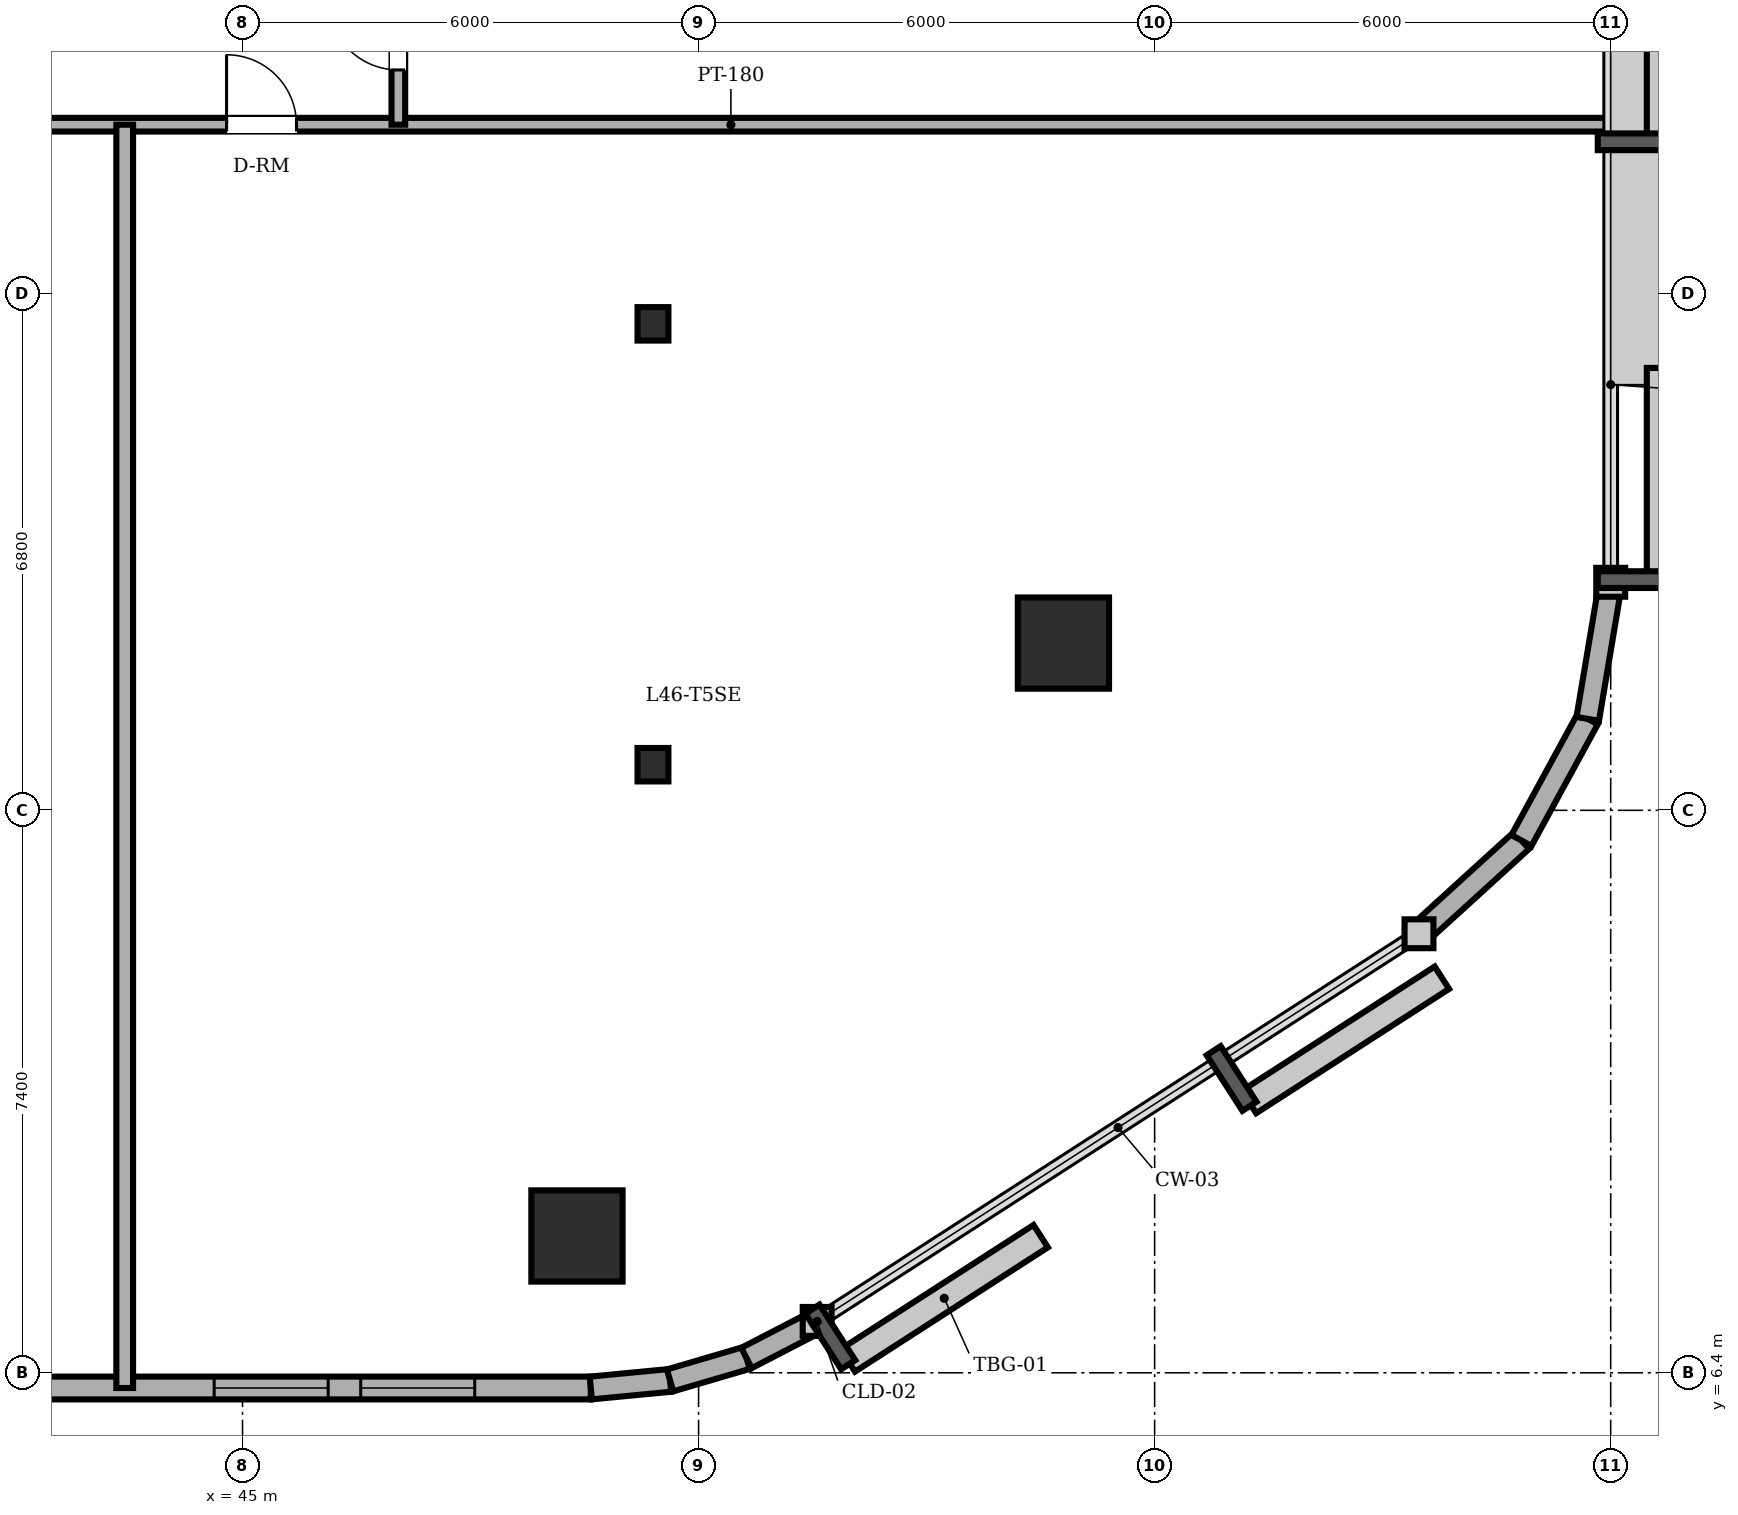
"""IFC4 building model, lengths in metres.
Left out: names, types, materials, properties, quantities, classifications, styles, units other than length and angle.
Written with IfcOpenShell. Run it as: python <this file> out.ifc"""

import sys

from ifc_helpers import new_model, si_unit, direction, frame, frame_2d, origin, origin_2d, place, context, subcontext, project, spatial, rectangle, circle, i_section, extrude, element, fill, save


model = new_model("IFC4")
c1 = context("Model", 3, precision=1e-05, world=origin(), true_north=direction((0.0, 1.0)))
c2 = subcontext(c1, "Body", "Model", "MODEL_VIEW")
j1 = project(units=[si_unit("LENGTHUNIT", "METRE"), si_unit("PLANEANGLEUNIT", "RADIAN")], contexts=[c1])
p1 = place(None, origin())
s1 = spatial("IfcSite", under=j1, at=p1, CompositionType="ELEMENT")
p2 = place(p1, origin())
s2 = spatial("IfcBuilding", under=s1, at=p2, CompositionType="ELEMENT")
p3 = place(p2, frame((0.0, 0.0, 176.2)))
s3 = spatial("IfcBuildingStorey", under=s2, at=p3, CompositionType="ELEMENT", Elevation=176.2)
for number, where, z_axis, x_axis in (
    (1, (49.4, 8.2, 0.0), (0.0, 0.0, 1.0), (1.0, 0.0, 0.0)),
    (2, (55.8, 16.0, 0.0), (0.0, 0.0, 1.0), (1.0, 0.0, 0.0)),
):
    element("IfcColumn", number, at=place(p3, frame(where, z_axis=z_axis, x_axis=x_axis)), inside=s3, PredefinedType="COLUMN", context=c2, shape_type="SweptSolid", body=[
        extrude(circle(Radius=0.6, at=origin_2d()), origin(), (0.0, 0.0, 1.0), 3.6),
    ])
for number, where, z_axis, x_axis in (
    (3, (50.4, 14.4, 0.0), (0.0, 0.0, 1.0), (1.0, 0.0, 0.0)),
    (4, (50.4, 20.2, 0.0), (0.0, 0.0, 1.0), (1.0, 0.0, 0.0)),
):
    element("IfcColumn", number, at=place(p3, frame(where, z_axis=z_axis, x_axis=x_axis)), inside=s3, PredefinedType="COLUMN", context=c2, shape_type="SweptSolid", body=[
        extrude(i_section(OverallWidth=0.406, OverallDepth=0.44, WebThickness=0.024, FlangeThickness=0.039, FilletRadius=0.015, at=origin_2d()), origin(), (0.0, 0.0, 1.0), 3.6),
    ])
p4 = place(p3, frame((19.3, 6.2, 0.0), z_axis=(0.0, 0.0, 1.0), x_axis=(1.0, 0.0, 0.0)))
e5 = element("IfcWall", 5, at=p4, inside=s3, PredefinedType="SOLIDWALL", context=c2, shape_type="SweptSolid", body=[
    extrude(rectangle(XDim=30.282, YDim=0.3, at=frame_2d((15.141, 0.0))), origin(), (0.0, 0.0, 1.0), 3.4),
])
p5 = place(p4, frame((7.725, 0.0, 0.0)))
e6 = element("IfcOpeningElement", 6, at=p5, cuts=e5, PredefinedType="OPENING", context=c2, shape_type="SweptSolid", body=[
    extrude(rectangle(XDim=0.95, YDim=2.2, at=frame_2d((0.475, 1.1))), frame((0.0, 0.16, 0.0), z_axis=(0.0, -1.0, 0.0), x_axis=(1.0, 0.0, 0.0)), (0.0, 0.0, 1.0), 0.32),
])
p6 = place(p4, frame((1.25, 0.0, 0.85)))
e7 = element("IfcOpeningElement", 7, at=p6, cuts=e5, PredefinedType="OPENING", context=c2, shape_type="SweptSolid", body=[
    extrude(rectangle(XDim=1.5, YDim=1.55, at=frame_2d((0.75, 0.775))), frame((0.0, 0.16, 0.0), z_axis=(0.0, -1.0, 0.0), x_axis=(1.0, 0.0, 0.0)), (0.0, 0.0, 1.0), 0.32),
])
p7 = place(p4, frame((2.9, 0.0, 0.85)))
e8 = element("IfcOpeningElement", 8, at=p7, cuts=e5, PredefinedType="OPENING", context=c2, shape_type="SweptSolid", body=[
    extrude(rectangle(XDim=1.5, YDim=1.55, at=frame_2d((0.75, 0.775))), frame((0.0, 0.16, 0.0), z_axis=(0.0, -1.0, 0.0), x_axis=(1.0, 0.0, 0.0)), (0.0, 0.0, 1.0), 0.32),
])
p8 = place(p4, frame((12.167, 0.0, 0.85)))
e9 = element("IfcOpeningElement", 9, at=p8, cuts=e5, PredefinedType="OPENING", context=c2, shape_type="SweptSolid", body=[
    extrude(rectangle(XDim=1.5, YDim=1.55, at=frame_2d((0.75, 0.775))), frame((0.0, 0.16, 0.0), z_axis=(0.0, -1.0, 0.0), x_axis=(1.0, 0.0, 0.0)), (0.0, 0.0, 1.0), 0.32),
])
p9 = place(p4, frame((15.983, 0.0, 0.85)))
e10 = element("IfcOpeningElement", 10, at=p9, cuts=e5, PredefinedType="OPENING", context=c2, shape_type="SweptSolid", body=[
    extrude(rectangle(XDim=1.5, YDim=1.55, at=frame_2d((0.75, 0.775))), frame((0.0, 0.16, 0.0), z_axis=(0.0, -1.0, 0.0), x_axis=(1.0, 0.0, 0.0)), (0.0, 0.0, 1.0), 0.32),
])
p10 = place(p4, frame((21.6, 0.0, 0.85)))
e11 = element("IfcOpeningElement", 11, at=p10, cuts=e5, PredefinedType="OPENING", context=c2, shape_type="SweptSolid", body=[
    extrude(rectangle(XDim=1.5, YDim=1.55, at=frame_2d((0.75, 0.775))), frame((0.0, 0.16, 0.0), z_axis=(0.0, -1.0, 0.0), x_axis=(1.0, 0.0, 0.0)), (0.0, 0.0, 1.0), 0.32),
])
p11 = place(p4, frame((25.327, 0.0, 0.85)))
e12 = element("IfcOpeningElement", 12, at=p11, cuts=e5, PredefinedType="OPENING", context=c2, shape_type="SweptSolid", body=[
    extrude(rectangle(XDim=1.5, YDim=1.55, at=frame_2d((0.75, 0.775))), frame((0.0, 0.16, 0.0), z_axis=(0.0, -1.0, 0.0), x_axis=(1.0, 0.0, 0.0)), (0.0, 0.0, 1.0), 0.32),
])
p12 = place(p4, frame((27.255, 0.0, 0.85)))
e13 = element("IfcOpeningElement", 13, at=p12, cuts=e5, PredefinedType="OPENING", context=c2, shape_type="SweptSolid", body=[
    extrude(rectangle(XDim=1.5, YDim=1.55, at=frame_2d((0.75, 0.775))), frame((0.0, 0.16, 0.0), z_axis=(0.0, -1.0, 0.0), x_axis=(1.0, 0.0, 0.0)), (0.0, 0.0, 1.0), 0.32),
])
p13 = place(p3, frame((49.582, 6.2, 0.0), z_axis=(0.0, 0.0, 1.0), x_axis=(0.995426089968, 0.095534807324, 0.0)))
e14 = element("IfcWall", 14, at=p13, inside=s3, PredefinedType="SOLIDWALL", context=c2, shape_type="SweptSolid", body=[
    extrude(rectangle(XDim=1.048, YDim=0.3, at=frame_2d((0.524, 0.0))), origin(), (0.0, 0.0, 1.0), 3.4),
])
p14 = place(p3, frame((50.625, 6.3, 0.0), z_axis=(0.0, 0.0, 1.0), x_axis=(0.959528674476, 0.281610942363, 0.0)))
e15 = element("IfcWall", 15, at=p14, inside=s3, PredefinedType="SOLIDWALL", context=c2, shape_type="SweptSolid", body=[
    extrude(rectangle(XDim=1.047, YDim=0.3, at=frame_2d((0.524, 0.0))), origin(), (0.0, 0.0, 1.0), 3.4),
])
p15 = place(p3, frame((51.63, 6.595, 0.0), z_axis=(0.0, 0.0, 1.0), x_axis=(0.888283247196, 0.459296062198, 0.0)))
e16 = element("IfcWall", 16, at=p15, inside=s3, PredefinedType="SOLIDWALL", context=c2, shape_type="SweptSolid", body=[
    extrude(rectangle(XDim=1.047, YDim=0.3, at=frame_2d((0.523, 0.0))), origin(), (0.0, 0.0, 1.0), 3.4),
])
p16 = place(p3, frame((60.478, 12.176, 0.0), z_axis=(0.0, 0.0, 1.0), x_axis=(0.73947929393, 0.673179302897, 0.0)))
e17 = element("IfcWall", 17, at=p16, inside=s3, PredefinedType="SOLIDWALL", context=c2, shape_type="SweptSolid", body=[
    extrude(rectangle(XDim=1.823, YDim=0.3, at=frame_2d((0.911, 0.0))), origin(), (0.0, 0.0, 1.0), 3.4),
])
p17 = place(p3, frame((61.826, 13.403, 0.0), z_axis=(0.0, 0.0, 1.0), x_axis=(0.478608030646, 0.878028674362, 0.0)))
e18 = element("IfcWall", 18, at=p17, inside=s3, PredefinedType="SOLIDWALL", context=c2, shape_type="SweptSolid", body=[
    extrude(rectangle(XDim=1.822, YDim=0.3, at=frame_2d((0.911, 0.0))), origin(), (0.0, 0.0, 1.0), 3.4),
])
p18 = place(p3, frame((62.698, 15.003, 0.0), z_axis=(0.0, 0.0, 1.0), x_axis=(0.165724081207, 0.986172159873, 0.0)))
e19 = element("IfcWall", 19, at=p18, inside=s3, PredefinedType="SOLIDWALL", context=c2, shape_type="SweptSolid", body=[
    extrude(rectangle(XDim=1.822, YDim=0.3, at=frame_2d((0.911, 0.0))), origin(), (0.0, 0.0, 1.0), 3.4),
])
p19 = place(p3, frame((39.85, 22.82, 0.0), z_axis=(0.0, 0.0, 1.0), x_axis=(1.0, 0.0, 0.0)))
e20 = element("IfcWall", 20, at=p19, inside=s3, PredefinedType="PARTITIONING", context=c2, shape_type="SweptSolid", body=[
    extrude(rectangle(XDim=23.15, YDim=0.18, at=frame_2d((11.575, 0.0))), origin(), (0.0, 0.0, 1.0), 3.4),
])
p20 = place(p19, frame((4.94, 0.0, 0.0)))
e21 = element("IfcOpeningElement", 21, at=p20, cuts=e20, PredefinedType="OPENING", context=c2, shape_type="SweptSolid", body=[
    extrude(rectangle(XDim=0.92, YDim=2.1, at=frame_2d((0.46, 1.05))), frame((0.0, 0.1, 0.0), z_axis=(0.0, -1.0, 0.0), x_axis=(1.0, 0.0, 0.0)), (0.0, 0.0, 1.0), 0.2),
])
p21 = place(p3, frame((43.45, 6.2, 0.0), z_axis=(0.0, 0.0, 1.0), x_axis=(0.0, 1.0, 0.0)))
e22 = element("IfcWall", 22, at=p21, inside=s3, PredefinedType="PARTITIONING", context=c2, shape_type="SweptSolid", body=[
    extrude(rectangle(XDim=16.62, YDim=0.22, at=frame_2d((8.31, 0.0))), origin(), (0.0, 0.0, 1.0), 3.4),
])
p22 = place(p3, frame((47.05, 22.82, 0.0), z_axis=(0.0, 0.0, 1.0), x_axis=(0.0, 1.0, 0.0)))
e23 = element("IfcWall", 23, at=p22, inside=s3, PredefinedType="PARTITIONING", context=c2, shape_type="SweptSolid", body=[
    extrude(rectangle(XDim=2.36, YDim=0.18, at=frame_2d((1.18, 0.0))), origin(), (0.0, 0.0, 1.0), 3.4),
])
p23 = place(p22, frame((0.72, 0.0, 0.0)))
e24 = element("IfcOpeningElement", 24, at=p23, cuts=e23, PredefinedType="OPENING", context=c2, shape_type="SweptSolid", body=[
    extrude(rectangle(XDim=0.92, YDim=2.1, at=frame_2d((0.46, 1.05))), frame((0.0, 0.1, 0.0), z_axis=(0.0, -1.0, 0.0), x_axis=(1.0, 0.0, 0.0)), (0.0, 0.0, 1.0), 0.2),
])
p24 = place(p11, origin())
e25 = element("IfcWindow", 25, at=p24, inside=s3, PartitioningType="DOUBLE_PANEL_VERTICAL", PredefinedType="WINDOW", context=c2, shape_type="SweptSolid", body=[
    extrude(rectangle(XDim=1.5, YDim=1.55, at=frame_2d((0.75, 0.775))), frame((0.0, 0.03, 0.0), z_axis=(0.0, -1.0, 0.0), x_axis=(1.0, 0.0, 0.0)), (0.0, 0.0, 1.0), 0.06),
])
fill(e12, e25)
p25 = place(p12, origin())
e26 = element("IfcWindow", 26, at=p25, inside=s3, PartitioningType="DOUBLE_PANEL_VERTICAL", PredefinedType="WINDOW", context=c2, shape_type="SweptSolid", body=[
    extrude(rectangle(XDim=1.5, YDim=1.55, at=frame_2d((0.75, 0.775))), frame((0.0, 0.03, 0.0), z_axis=(0.0, -1.0, 0.0), x_axis=(1.0, 0.0, 0.0)), (0.0, 0.0, 1.0), 0.06),
])
fill(e13, e26)
p26 = place(p23, origin())
e27 = element("IfcDoor", 27, at=p26, inside=s3, OperationType="SINGLE_SWING_RIGHT", PredefinedType="DOOR", context=c2, shape_type="SweptSolid", body=[
    extrude(rectangle(XDim=0.92, YDim=2.1, at=frame_2d((0.46, 1.05))), frame((0.0, 0.025, 0.0), z_axis=(0.0, -1.0, 0.0), x_axis=(1.0, 0.0, 0.0)), (0.0, 0.0, 1.0), 0.05),
])
fill(e24, e27)
p27 = place(p20, origin())
e28 = element("IfcDoor", 28, at=p27, inside=s3, OperationType="SINGLE_SWING_LEFT", PredefinedType="DOOR", context=c2, shape_type="SweptSolid", body=[
    extrude(rectangle(XDim=0.92, YDim=2.1, at=frame_2d((0.46, 1.05))), frame((0.0, 0.025, 0.0), z_axis=(0.0, -1.0, 0.0), x_axis=(1.0, 0.0, 0.0)), (0.0, 0.0, 1.0), 0.05),
])
fill(e21, e28)
save(model, sys.argv[1])
